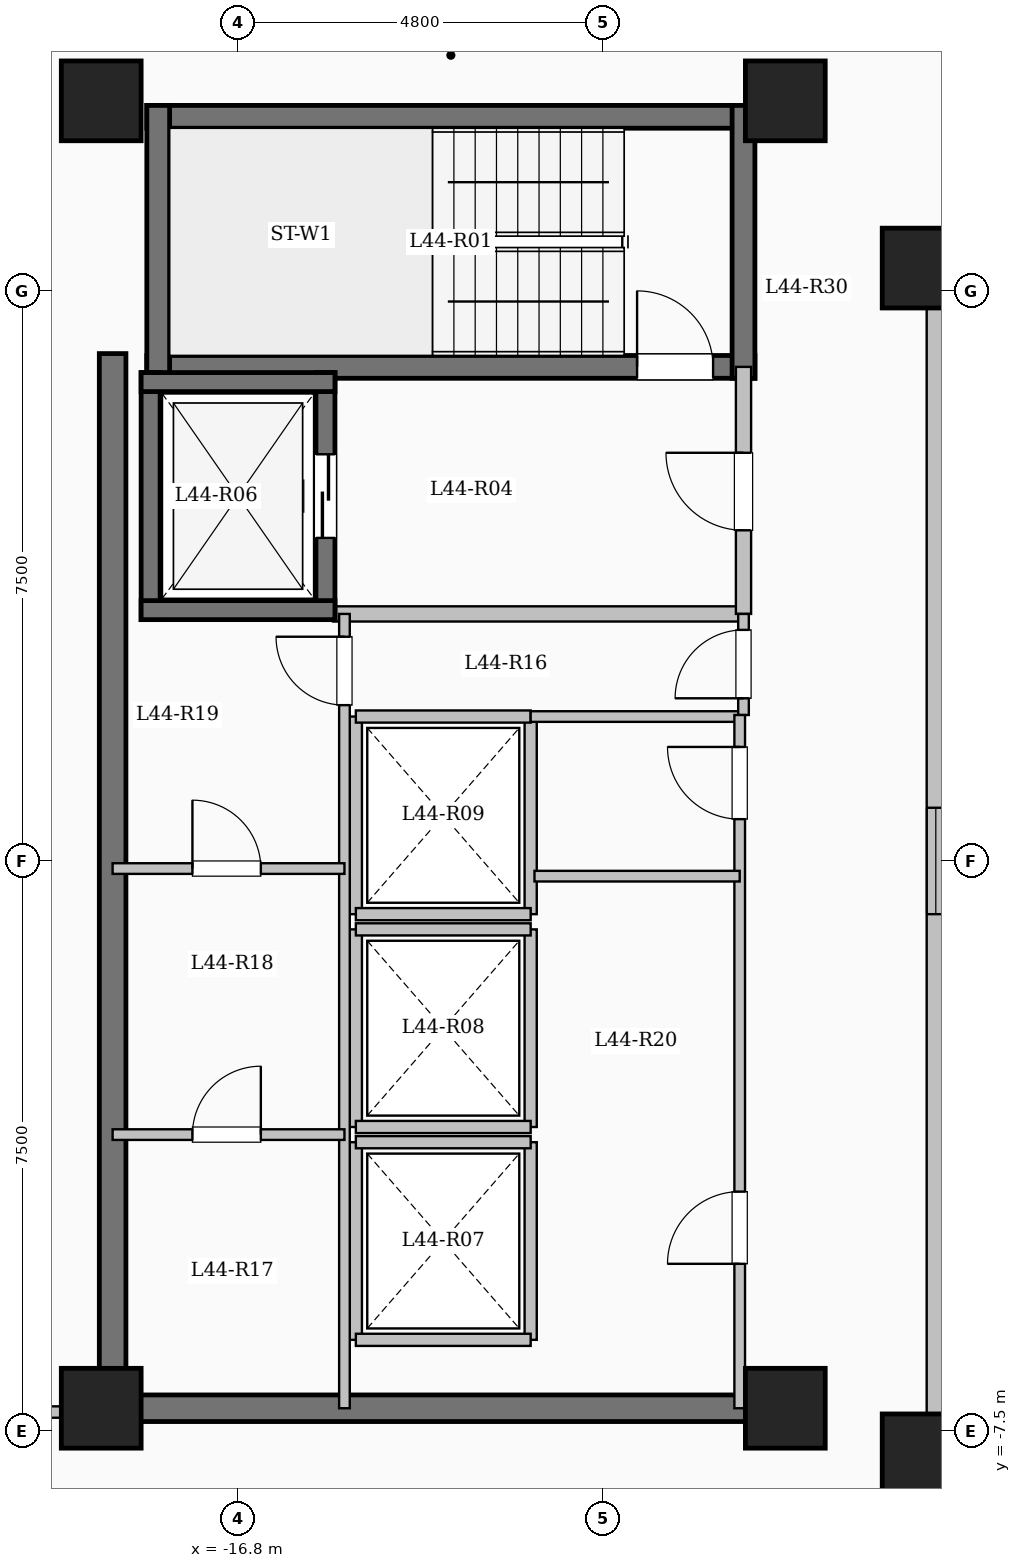
"""IFC4 building model, lengths in metres.
Left out: names, types, materials, properties, quantities, classifications, styles, units other than length and angle.
Written with IfcOpenShell. Run it as: python <this file> out.ifc"""

import sys

from ifc_helpers import new_model, si_unit, direction, frame, frame_2d, origin, origin_2d, place, context, subcontext, project, spatial, rectangle, extrude, element, fill, save


model = new_model("IFC4")
c1 = context("Model", 3, precision=1e-05, world=origin(), true_north=direction((0.0, 1.0)))
c2 = subcontext(c1, "Body", "Model", "MODEL_VIEW")
j1 = project(units=[si_unit("LENGTHUNIT", "METRE"), si_unit("PLANEANGLEUNIT", "RADIAN")], contexts=[c1])
p1 = place(None, origin())
s1 = spatial("IfcSite", under=j1, at=p1, CompositionType="ELEMENT")
p2 = place(p1, origin())
s2 = spatial("IfcBuilding", under=s1, at=p2, CompositionType="ELEMENT")
p3 = place(p2, frame((0.0, 0.0, 162.75)))
s3 = spatial("IfcBuildingStorey", under=s2, at=p3, CompositionType="ELEMENT", Elevation=162.75)
for number, where, z_axis, x_axis in (
    (1, (-7.8, -7.8, 0.0), (0.0, 0.0, 1.0), (1.0, 0.0, 0.0)),
    (2, (-7.8, 7.8, 0.0), (0.0, 0.0, 1.0), (1.0, 0.0, 0.0)),
    (3, (-9.6, -7.2, 0.0), (0.0, 0.0, 1.0), (1.0, 0.0, 0.0)),
    (4, (-9.6, 10.0, 0.0), (0.0, 0.0, 1.0), (1.0, 0.0, 0.0)),
    (5, (-18.6, -7.2, 0.0), (0.0, 0.0, 1.0), (1.0, 0.0, 0.0)),
    (6, (-18.6, 10.0, 0.0), (0.0, 0.0, 1.0), (1.0, 0.0, 0.0)),
):
    element("IfcColumn", number, at=place(p3, frame(where, z_axis=z_axis, x_axis=x_axis)), inside=s3, PredefinedType="COLUMN", context=c2, shape_type="SweptSolid", body=[
        extrude(rectangle(XDim=1.05, YDim=1.05, at=origin_2d()), origin(), (0.0, 0.0, 1.0), 3.35),
    ])
p4 = place(p3, frame((-7.62, -7.62, 0.0), z_axis=(0.0, 0.0, 1.0), x_axis=(1.0, 0.0, 0.0)))
e7 = element("IfcWall", 7, at=p4, inside=s3, PredefinedType="SOLIDWALL", context=c2, shape_type="SweptSolid", body=[
    extrude(rectangle(XDim=15.24, YDim=0.24, at=frame_2d((7.62, 0.0))), origin(), (0.0, 0.0, 1.0), 3.1),
])
p5 = place(p4, frame((6.92, 0.0, 0.95)))
e8 = element("IfcOpeningElement", 8, at=p5, cuts=e7, PredefinedType="OPENING", context=c2, shape_type="SweptSolid", body=[
    extrude(rectangle(XDim=1.4, YDim=1.5, at=frame_2d((0.7, 0.75))), frame((0.0, 0.13, 0.0), z_axis=(0.0, -1.0, 0.0), x_axis=(1.0, 0.0, 0.0)), (0.0, 0.0, 1.0), 0.26),
])
p6 = place(p3, frame((7.62, 7.62, 0.0), z_axis=(0.0, 0.0, 1.0), x_axis=(-1.0, 0.0, 0.0)))
e9 = element("IfcWall", 9, at=p6, inside=s3, PredefinedType="SOLIDWALL", context=c2, shape_type="SweptSolid", body=[
    extrude(rectangle(XDim=15.24, YDim=0.24, at=frame_2d((7.62, 0.0))), origin(), (0.0, 0.0, 1.0), 3.1),
])
p7 = place(p6, frame((6.92, 0.0, 0.95)))
e10 = element("IfcOpeningElement", 10, at=p7, cuts=e9, PredefinedType="OPENING", context=c2, shape_type="SweptSolid", body=[
    extrude(rectangle(XDim=1.4, YDim=1.5, at=frame_2d((0.7, 0.75))), frame((0.0, 0.13, 0.0), z_axis=(0.0, -1.0, 0.0), x_axis=(1.0, 0.0, 0.0)), (0.0, 0.0, 1.0), 0.26),
])
p8 = place(p3, frame((-7.62, 7.62, 0.0), z_axis=(0.0, 0.0, 1.0), x_axis=(0.0, -1.0, 0.0)))
e11 = element("IfcWall", 11, at=p8, inside=s3, PredefinedType="SOLIDWALL", context=c2, shape_type="SweptSolid", body=[
    extrude(rectangle(XDim=15.24, YDim=0.24, at=frame_2d((7.62, 0.0))), origin(), (0.0, 0.0, 1.0), 3.1),
])
p9 = place(p8, frame((6.92, 0.0, 0.95)))
e12 = element("IfcOpeningElement", 12, at=p9, cuts=e11, PredefinedType="OPENING", context=c2, shape_type="SweptSolid", body=[
    extrude(rectangle(XDim=1.4, YDim=1.5, at=frame_2d((0.7, 0.75))), frame((0.0, 0.13, 0.0), z_axis=(0.0, -1.0, 0.0), x_axis=(1.0, 0.0, 0.0)), (0.0, 0.0, 1.0), 0.26),
])
p10 = place(p3, frame((-18.0, 9.79, 0.0), z_axis=(0.0, 0.0, 1.0), x_axis=(1.0, 0.0, 0.0)))
e13 = element("IfcWall", 13, at=p10, inside=s3, PredefinedType="SHEAR", context=c2, shape_type="SweptSolid", body=[
    extrude(rectangle(XDim=8.0, YDim=0.3, at=frame_2d((4.0, 0.0))), origin(), (0.0, 0.0, 1.0), 3.35),
])
p11 = place(p3, frame((-18.0, 6.5, 0.0), z_axis=(0.0, 0.0, 1.0), x_axis=(1.0, 0.0, 0.0)))
e14 = element("IfcWall", 14, at=p11, inside=s3, PredefinedType="SHEAR", context=c2, shape_type="SweptSolid", body=[
    extrude(rectangle(XDim=8.0, YDim=0.3, at=frame_2d((4.0, 0.0))), origin(), (0.0, 0.0, 1.0), 3.35),
])
p12 = place(p11, frame((6.45, 0.0, 0.0)))
e15 = element("IfcOpeningElement", 15, at=p12, cuts=e14, PredefinedType="OPENING", context=c2, shape_type="SweptSolid", body=[
    extrude(rectangle(XDim=1.0, YDim=2.15, at=frame_2d((0.5, 1.075))), frame((0.0, 0.16, 0.0), z_axis=(0.0, -1.0, 0.0), x_axis=(1.0, 0.0, 0.0)), (0.0, 0.0, 1.0), 0.32),
])
for number, where, z_axis, x_axis in (
    (16, (-17.85, 6.35, 0.0), (0.0, 0.0, 1.0), (0.0, 1.0, 0.0)),
    (17, (-10.15, 6.35, 0.0), (0.0, 0.0, 1.0), (0.0, 1.0, 0.0)),
):
    element("IfcWall", number, at=place(p3, frame(where, z_axis=z_axis, x_axis=x_axis)), inside=s3, PredefinedType="SHEAR", context=c2, shape_type="SweptSolid", body=[
        extrude(rectangle(XDim=3.59, YDim=0.3, at=frame_2d((1.795, 0.0))), origin(), (0.0, 0.0, 1.0), 3.35),
    ])
p13 = place(p3, frame((-15.55, 3.25, 0.0), z_axis=(0.0, 0.0, 1.0), x_axis=(1.0, 0.0, 0.0)))
e18 = element("IfcWall", 18, at=p13, inside=s3, PredefinedType="SOLIDWALL", context=c2, shape_type="SweptSolid", body=[
    extrude(rectangle(XDim=5.4, YDim=0.2, at=frame_2d((2.7, 0.0))), origin(), (0.0, 0.0, 1.0), 3.1),
])
p14 = place(p3, frame((-10.15, 3.25, 0.0), z_axis=(0.0, 0.0, 1.0), x_axis=(0.0, 1.0, 0.0)))
e19 = element("IfcWall", 19, at=p14, inside=s3, PredefinedType="SOLIDWALL", context=c2, shape_type="SweptSolid", body=[
    extrude(rectangle(XDim=3.25, YDim=0.2, at=frame_2d((1.625, 0.0))), origin(), (0.0, 0.0, 1.0), 3.1),
])
p15 = place(p14, frame((1.1, 0.0, 0.0)))
e20 = element("IfcOpeningElement", 20, at=p15, cuts=e19, PredefinedType="OPENING", context=c2, shape_type="SweptSolid", body=[
    extrude(rectangle(XDim=1.02, YDim=2.15, at=frame_2d((0.51, 1.075))), frame((0.0, 0.11, 0.0), z_axis=(0.0, -1.0, 0.0), x_axis=(1.0, 0.0, 0.0)), (0.0, 0.0, 1.0), 0.22),
])
p16 = place(p3, frame((-17.95, 3.175, 0.0), z_axis=(0.0, 0.0, 1.0), x_axis=(0.0, 1.0, 0.0)))
e21 = element("IfcWall", 21, at=p16, inside=s3, PredefinedType="SHEAR", context=c2, shape_type="SweptSolid", body=[
    extrude(rectangle(XDim=3.25, YDim=0.25, at=frame_2d((1.625, 0.0))), origin(), (0.0, 0.0, 1.0), 3.35),
])
p17 = place(p3, frame((-15.65, 3.175, 0.0), z_axis=(0.0, 0.0, 1.0), x_axis=(0.0, 1.0, 0.0)))
e22 = element("IfcWall", 22, at=p17, inside=s3, PredefinedType="SHEAR", context=c2, shape_type="SweptSolid", body=[
    extrude(rectangle(XDim=3.25, YDim=0.25, at=frame_2d((1.625, 0.0))), origin(), (0.0, 0.0, 1.0), 3.35),
])
p18 = place(p17, frame((1.075, 0.0, 0.0)))
e23 = element("IfcOpeningElement", 23, at=p18, cuts=e22, PredefinedType="OPENING", context=c2, shape_type="SweptSolid", body=[
    extrude(rectangle(XDim=1.1, YDim=2.15, at=frame_2d((0.55, 1.075))), frame((0.0, 0.135, 0.0), z_axis=(0.0, -1.0, 0.0), x_axis=(1.0, 0.0, 0.0)), (0.0, 0.0, 1.0), 0.27),
])
for number, where, z_axis, x_axis in (
    (24, (-18.075, 3.3, 0.0), (0.0, 0.0, 1.0), (1.0, 0.0, 0.0)),
    (25, (-18.075, 6.3, 0.0), (0.0, 0.0, 1.0), (1.0, 0.0, 0.0)),
):
    element("IfcWall", number, at=place(p3, frame(where, z_axis=z_axis, x_axis=x_axis)), inside=s3, PredefinedType="SHEAR", context=c2, shape_type="SweptSolid", body=[
        extrude(rectangle(XDim=2.55, YDim=0.25, at=frame_2d((1.275, 0.0))), origin(), (0.0, 0.0, 1.0), 3.35),
    ])
for number, where, z_axis, x_axis in (
    (26, (-15.25, -6.3, 0.0), (0.0, 0.0, 1.0), (0.0, 1.0, 0.0)),
    (27, (-12.95, -6.3, 0.0), (0.0, 0.0, 1.0), (0.0, 1.0, 0.0)),
):
    element("IfcWall", number, at=place(p3, frame(where, z_axis=z_axis, x_axis=x_axis)), inside=s3, PredefinedType="SOLIDWALL", context=c2, shape_type="SweptSolid", body=[
        extrude(rectangle(XDim=2.6, YDim=0.16, at=frame_2d((1.3, 0.0))), origin(), (0.0, 0.0, 1.0), 3.1),
    ])
for number, where, z_axis, x_axis in (
    (28, (-15.25, -6.3, 0.0), (0.0, 0.0, 1.0), (1.0, 0.0, 0.0)),
    (29, (-15.25, -3.7, 0.0), (0.0, 0.0, 1.0), (1.0, 0.0, 0.0)),
):
    element("IfcWall", number, at=place(p3, frame(where, z_axis=z_axis, x_axis=x_axis)), inside=s3, PredefinedType="SOLIDWALL", context=c2, shape_type="SweptSolid", body=[
        extrude(rectangle(XDim=2.3, YDim=0.16, at=frame_2d((1.15, 0.0))), origin(), (0.0, 0.0, 1.0), 3.1),
    ])
for number, where, z_axis, x_axis in (
    (30, (-15.25, -3.5, 0.0), (0.0, 0.0, 1.0), (0.0, 1.0, 0.0)),
    (31, (-12.95, -3.5, 0.0), (0.0, 0.0, 1.0), (0.0, 1.0, 0.0)),
):
    element("IfcWall", number, at=place(p3, frame(where, z_axis=z_axis, x_axis=x_axis)), inside=s3, PredefinedType="SOLIDWALL", context=c2, shape_type="SweptSolid", body=[
        extrude(rectangle(XDim=2.6, YDim=0.16, at=frame_2d((1.3, 0.0))), origin(), (0.0, 0.0, 1.0), 3.1),
    ])
for number, where, z_axis, x_axis in (
    (32, (-15.25, -3.5, 0.0), (0.0, 0.0, 1.0), (1.0, 0.0, 0.0)),
    (33, (-15.25, -0.9, 0.0), (0.0, 0.0, 1.0), (1.0, 0.0, 0.0)),
):
    element("IfcWall", number, at=place(p3, frame(where, z_axis=z_axis, x_axis=x_axis)), inside=s3, PredefinedType="SOLIDWALL", context=c2, shape_type="SweptSolid", body=[
        extrude(rectangle(XDim=2.3, YDim=0.16, at=frame_2d((1.15, 0.0))), origin(), (0.0, 0.0, 1.0), 3.1),
    ])
for number, where, z_axis, x_axis in (
    (34, (-15.25, -0.7, 0.0), (0.0, 0.0, 1.0), (0.0, 1.0, 0.0)),
    (35, (-12.95, -0.7, 0.0), (0.0, 0.0, 1.0), (0.0, 1.0, 0.0)),
):
    element("IfcWall", number, at=place(p3, frame(where, z_axis=z_axis, x_axis=x_axis)), inside=s3, PredefinedType="SOLIDWALL", context=c2, shape_type="SweptSolid", body=[
        extrude(rectangle(XDim=2.6, YDim=0.16, at=frame_2d((1.3, 0.0))), origin(), (0.0, 0.0, 1.0), 3.1),
    ])
for number, where, z_axis, x_axis in (
    (36, (-15.25, -0.7, 0.0), (0.0, 0.0, 1.0), (1.0, 0.0, 0.0)),
    (37, (-15.25, 1.9, 0.0), (0.0, 0.0, 1.0), (1.0, 0.0, 0.0)),
):
    element("IfcWall", number, at=place(p3, frame(where, z_axis=z_axis, x_axis=x_axis)), inside=s3, PredefinedType="SOLIDWALL", context=c2, shape_type="SweptSolid", body=[
        extrude(rectangle(XDim=2.3, YDim=0.16, at=frame_2d((1.15, 0.0))), origin(), (0.0, 0.0, 1.0), 3.1),
    ])
p19 = place(p3, frame((-18.45, -7.375, 0.0), z_axis=(0.0, 0.0, 1.0), x_axis=(0.0, 1.0, 0.0)))
e38 = element("IfcWall", 38, at=p19, inside=s3, PredefinedType="SHEAR", context=c2, shape_type="SweptSolid", body=[
    extrude(rectangle(XDim=14.05, YDim=0.35, at=frame_2d((7.025, 0.0))), origin(), (0.0, 0.0, 1.0), 3.35),
])
p20 = place(p3, frame((-18.625, -7.2, 0.0), z_axis=(0.0, 0.0, 1.0), x_axis=(1.0, 0.0, 0.0)))
e39 = element("IfcWall", 39, at=p20, inside=s3, PredefinedType="SHEAR", context=c2, shape_type="SweptSolid", body=[
    extrude(rectangle(XDim=8.55, YDim=0.35, at=frame_2d((4.275, 0.0))), origin(), (0.0, 0.0, 1.0), 3.35),
])
p21 = place(p3, frame((-12.95, 1.9, 0.0), z_axis=(0.0, 0.0, 1.0), x_axis=(1.0, 0.0, 0.0)))
e40 = element("IfcWall", 40, at=p21, inside=s3, PredefinedType="PARTITIONING", context=c2, shape_type="SweptSolid", body=[
    extrude(rectangle(XDim=2.8, YDim=0.14, at=frame_2d((1.4, 0.0))), origin(), (0.0, 0.0, 1.0), 3.1),
])
p22 = place(p3, frame((-10.15, 1.92, 0.0), z_axis=(0.0, 0.0, 1.0), x_axis=(0.0, 1.0, 0.0)))
e41 = element("IfcWall", 41, at=p22, inside=s3, PredefinedType="PARTITIONING", context=c2, shape_type="SweptSolid", body=[
    extrude(rectangle(XDim=1.33, YDim=0.14, at=frame_2d((0.665, 0.0))), origin(), (0.0, 0.0, 1.0), 3.1),
])
p23 = place(p22, frame((0.22, 0.0, 0.0)))
e42 = element("IfcOpeningElement", 42, at=p23, cuts=e41, PredefinedType="OPENING", context=c2, shape_type="SweptSolid", body=[
    extrude(rectangle(XDim=0.9, YDim=2.08, at=frame_2d((0.45, 1.04))), frame((0.0, 0.08, 0.0), z_axis=(0.0, -1.0, 0.0), x_axis=(1.0, 0.0, 0.0)), (0.0, 0.0, 1.0), 0.16),
])
p24 = place(p3, frame((-15.4, -7.2, 0.0), z_axis=(0.0, 0.0, 1.0), x_axis=(0.0, 1.0, 0.0)))
e43 = element("IfcWall", 43, at=p24, inside=s3, PredefinedType="PARTITIONING", context=c2, shape_type="SweptSolid", body=[
    extrude(rectangle(XDim=10.45, YDim=0.14, at=frame_2d((5.225, 0.0))), origin(), (0.0, 0.0, 1.0), 3.1),
])
p25 = place(p24, frame((9.25, 0.0, 0.0)))
e44 = element("IfcOpeningElement", 44, at=p25, cuts=e43, PredefinedType="OPENING", context=c2, shape_type="SweptSolid", body=[
    extrude(rectangle(XDim=0.9, YDim=2.08, at=frame_2d((0.45, 1.04))), frame((0.0, 0.08, 0.0), z_axis=(0.0, -1.0, 0.0), x_axis=(1.0, 0.0, 0.0)), (0.0, 0.0, 1.0), 0.16),
])
p26 = place(p3, frame((-18.45, -3.6, 0.0), z_axis=(0.0, 0.0, 1.0), x_axis=(1.0, 0.0, 0.0)))
e45 = element("IfcWall", 45, at=p26, inside=s3, PredefinedType="PARTITIONING", context=c2, shape_type="SweptSolid", body=[
    extrude(rectangle(XDim=3.05, YDim=0.14, at=frame_2d((1.525, 0.0))), origin(), (0.0, 0.0, 1.0), 3.1),
])
p27 = place(p26, frame((1.05, 0.0, 0.0)))
e46 = element("IfcOpeningElement", 46, at=p27, cuts=e45, PredefinedType="OPENING", context=c2, shape_type="SweptSolid", body=[
    extrude(rectangle(XDim=0.9, YDim=2.08, at=frame_2d((0.45, 1.04))), frame((0.0, 0.08, 0.0), z_axis=(0.0, -1.0, 0.0), x_axis=(1.0, 0.0, 0.0)), (0.0, 0.0, 1.0), 0.16),
])
p28 = place(p3, frame((-18.45, -0.1, 0.0), z_axis=(0.0, 0.0, 1.0), x_axis=(1.0, 0.0, 0.0)))
e47 = element("IfcWall", 47, at=p28, inside=s3, PredefinedType="PARTITIONING", context=c2, shape_type="SweptSolid", body=[
    extrude(rectangle(XDim=3.05, YDim=0.14, at=frame_2d((1.525, 0.0))), origin(), (0.0, 0.0, 1.0), 3.1),
])
p29 = place(p28, frame((1.05, 0.0, 0.0)))
e48 = element("IfcOpeningElement", 48, at=p29, cuts=e47, PredefinedType="OPENING", context=c2, shape_type="SweptSolid", body=[
    extrude(rectangle(XDim=0.9, YDim=2.08, at=frame_2d((0.45, 1.04))), frame((0.0, 0.08, 0.0), z_axis=(0.0, -1.0, 0.0), x_axis=(1.0, 0.0, 0.0)), (0.0, 0.0, 1.0), 0.16),
])
p30 = place(p3, frame((-10.2, -7.2, 0.0), z_axis=(0.0, 0.0, 1.0), x_axis=(0.0, 1.0, 0.0)))
e49 = element("IfcWall", 49, at=p30, inside=s3, PredefinedType="PARTITIONING", context=c2, shape_type="SweptSolid", body=[
    extrude(rectangle(XDim=9.12, YDim=0.14, at=frame_2d((4.56, 0.0))), origin(), (0.0, 0.0, 1.0), 3.1),
])
p31 = place(p30, frame((1.9, 0.0, 0.0)))
e50 = element("IfcOpeningElement", 50, at=p31, cuts=e49, PredefinedType="OPENING", context=c2, shape_type="SweptSolid", body=[
    extrude(rectangle(XDim=0.95, YDim=2.12, at=frame_2d((0.475, 1.06))), frame((0.0, 0.08, 0.0), z_axis=(0.0, -1.0, 0.0), x_axis=(1.0, 0.0, 0.0)), (0.0, 0.0, 1.0), 0.16),
])
p32 = place(p30, frame((7.75, 0.0, 0.0)))
e51 = element("IfcOpeningElement", 51, at=p32, cuts=e49, PredefinedType="OPENING", context=c2, shape_type="SweptSolid", body=[
    extrude(rectangle(XDim=0.95, YDim=2.12, at=frame_2d((0.475, 1.06))), frame((0.0, 0.08, 0.0), z_axis=(0.0, -1.0, 0.0), x_axis=(1.0, 0.0, 0.0)), (0.0, 0.0, 1.0), 0.16),
])
p33 = place(p3, frame((-12.9, -0.2, 0.0), z_axis=(0.0, 0.0, 1.0), x_axis=(1.0, 0.0, 0.0)))
e52 = element("IfcWall", 52, at=p33, inside=s3, PredefinedType="PARTITIONING", context=c2, shape_type="SweptSolid", body=[
    extrude(rectangle(XDim=2.7, YDim=0.14, at=frame_2d((1.35, 0.0))), origin(), (0.0, 0.0, 1.0), 3.1),
])
p34 = place(p3, frame((-25.08, -7.25, 0.0), z_axis=(0.0, 0.0, 1.0), x_axis=(1.0, 0.0, 0.0)))
e53 = element("IfcWall", 53, at=p34, inside=s3, PredefinedType="PARTITIONING", context=c2, shape_type="SweptSolid", body=[
    extrude(rectangle(XDim=6.63, YDim=0.15, at=frame_2d((3.315, 0.0))), origin(), (0.0, 0.0, 1.0), 3.1),
])
p35 = place(p34, frame((3.58, 0.0, 0.0)))
e54 = element("IfcOpeningElement", 54, at=p35, cuts=e53, PredefinedType="OPENING", context=c2, shape_type="SweptSolid", body=[
    extrude(rectangle(XDim=1.08, YDim=2.15, at=frame_2d((0.54, 1.075))), frame((0.0, 0.085, 0.0), z_axis=(0.0, -1.0, 0.0), x_axis=(1.0, 0.0, 0.0)), (0.0, 0.0, 1.0), 0.17),
])
p36 = place(p9, origin())
e55 = element("IfcWindow", 55, at=p36, inside=s3, PartitioningType="SINGLE_PANEL", PredefinedType="WINDOW", context=c2, shape_type="SweptSolid", body=[
    extrude(rectangle(XDim=1.4, YDim=1.5, at=frame_2d((0.7, 0.75))), frame((0.0, 0.03, 0.0), z_axis=(0.0, -1.0, 0.0), x_axis=(1.0, 0.0, 0.0)), (0.0, 0.0, 1.0), 0.06),
])
fill(e12, e55)
p37 = place(p12, origin())
e56 = element("IfcDoor", 56, at=p37, inside=s3, OperationType="SINGLE_SWING_LEFT", PredefinedType="DOOR", context=c2, shape_type="SweptSolid", body=[
    extrude(rectangle(XDim=1.0, YDim=2.15, at=frame_2d((0.5, 1.075))), frame((0.0, 0.025, 0.0), z_axis=(0.0, -1.0, 0.0), x_axis=(1.0, 0.0, 0.0)), (0.0, 0.0, 1.0), 0.05),
])
fill(e15, e56)
p38 = place(p15, origin())
e57 = element("IfcDoor", 57, at=p38, inside=s3, OperationType="SINGLE_SWING_RIGHT", PredefinedType="DOOR", context=c2, shape_type="SweptSolid", body=[
    extrude(rectangle(XDim=1.02, YDim=2.15, at=frame_2d((0.51, 1.075))), frame((0.0, 0.025, 0.0), z_axis=(0.0, -1.0, 0.0), x_axis=(1.0, 0.0, 0.0)), (0.0, 0.0, 1.0), 0.05),
])
fill(e20, e57)
p39 = place(p18, origin())
e58 = element("IfcDoor", 58, at=p39, inside=s3, OperationType="SLIDING_TO_LEFT", PredefinedType="DOOR", context=c2, shape_type="SweptSolid", body=[
    extrude(rectangle(XDim=1.1, YDim=2.15, at=frame_2d((0.55, 1.075))), frame((0.0, 0.025, 0.0), z_axis=(0.0, -1.0, 0.0), x_axis=(1.0, 0.0, 0.0)), (0.0, 0.0, 1.0), 0.05),
])
fill(e23, e58)
p40 = place(p23, origin())
e59 = element("IfcDoor", 59, at=p40, inside=s3, OperationType="SINGLE_SWING_LEFT", PredefinedType="DOOR", context=c2, shape_type="SweptSolid", body=[
    extrude(rectangle(XDim=0.9, YDim=2.08, at=frame_2d((0.45, 1.04))), frame((0.0, 0.025, 0.0), z_axis=(0.0, -1.0, 0.0), x_axis=(1.0, 0.0, 0.0)), (0.0, 0.0, 1.0), 0.05),
])
fill(e42, e59)
p41 = place(p25, origin())
e60 = element("IfcDoor", 60, at=p41, inside=s3, OperationType="SINGLE_SWING_RIGHT", PredefinedType="DOOR", context=c2, shape_type="SweptSolid", body=[
    extrude(rectangle(XDim=0.9, YDim=2.08, at=frame_2d((0.45, 1.04))), frame((0.0, 0.025, 0.0), z_axis=(0.0, -1.0, 0.0), x_axis=(1.0, 0.0, 0.0)), (0.0, 0.0, 1.0), 0.05),
])
fill(e44, e60)
p42 = place(p29, origin())
e61 = element("IfcDoor", 61, at=p42, inside=s3, OperationType="SINGLE_SWING_LEFT", PredefinedType="DOOR", context=c2, shape_type="SweptSolid", body=[
    extrude(rectangle(XDim=0.9, YDim=2.08, at=frame_2d((0.45, 1.04))), frame((0.0, 0.025, 0.0), z_axis=(0.0, -1.0, 0.0), x_axis=(1.0, 0.0, 0.0)), (0.0, 0.0, 1.0), 0.05),
])
fill(e48, e61)
p43 = place(p27, origin())
e62 = element("IfcDoor", 62, at=p43, inside=s3, OperationType="SINGLE_SWING_RIGHT", PredefinedType="DOOR", context=c2, shape_type="SweptSolid", body=[
    extrude(rectangle(XDim=0.9, YDim=2.08, at=frame_2d((0.45, 1.04))), frame((0.0, 0.025, 0.0), z_axis=(0.0, -1.0, 0.0), x_axis=(1.0, 0.0, 0.0)), (0.0, 0.0, 1.0), 0.05),
])
fill(e46, e62)
p44 = place(p31, origin())
e63 = element("IfcDoor", 63, at=p44, inside=s3, OperationType="SINGLE_SWING_LEFT", PredefinedType="DOOR", context=c2, shape_type="SweptSolid", body=[
    extrude(rectangle(XDim=0.95, YDim=2.12, at=frame_2d((0.475, 1.06))), frame((0.0, 0.025, 0.0), z_axis=(0.0, -1.0, 0.0), x_axis=(1.0, 0.0, 0.0)), (0.0, 0.0, 1.0), 0.05),
])
fill(e50, e63)
p45 = place(p32, origin())
e64 = element("IfcDoor", 64, at=p45, inside=s3, OperationType="SINGLE_SWING_RIGHT", PredefinedType="DOOR", context=c2, shape_type="SweptSolid", body=[
    extrude(rectangle(XDim=0.95, YDim=2.12, at=frame_2d((0.475, 1.06))), frame((0.0, 0.025, 0.0), z_axis=(0.0, -1.0, 0.0), x_axis=(1.0, 0.0, 0.0)), (0.0, 0.0, 1.0), 0.05),
])
fill(e51, e64)
save(model, sys.argv[1])
